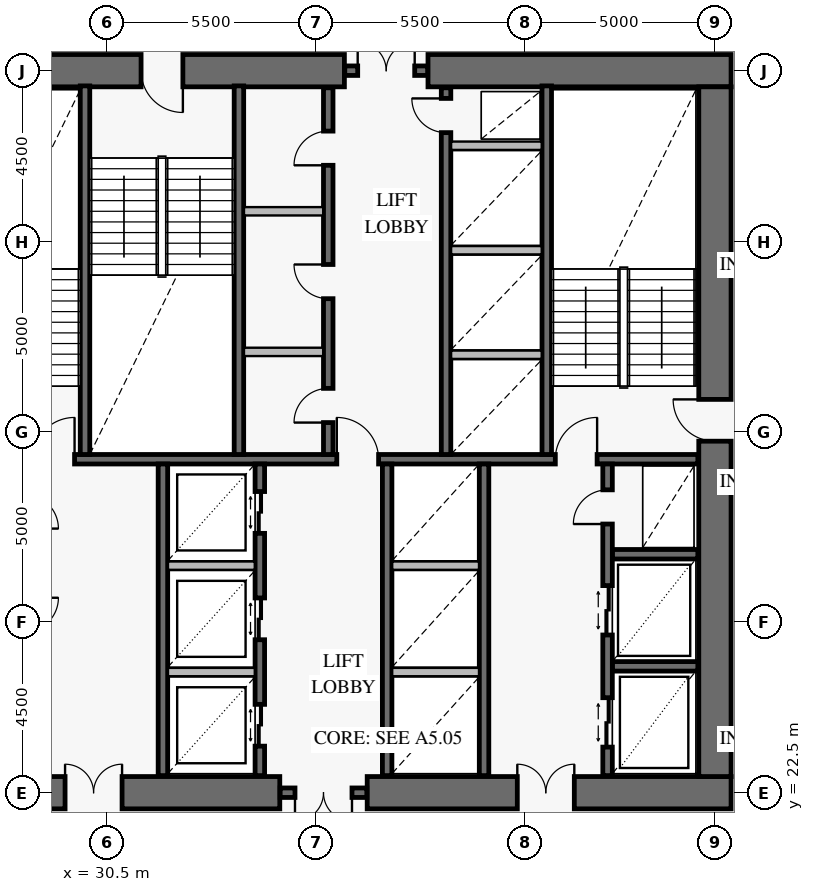
"""IFC4 building model, lengths in metres.
Left out: names, types, materials, properties, quantities, classifications, styles, units other than length and angle.
Written with IfcOpenShell. Run it as: python <this file> out.ifc"""

import sys

from ifc_helpers import new_model, si_unit, direction, frame, frame_2d, origin, place, context, subcontext, project, spatial, rectangle, extrude, element, fill, save


model = new_model("IFC4")
c1 = context("Model", 3, precision=1e-05, world=origin(), true_north=direction((0.0, 1.0)))
c2 = subcontext(c1, "Body", "Model", "MODEL_VIEW")
j1 = project(units=[si_unit("LENGTHUNIT", "METRE"), si_unit("PLANEANGLEUNIT", "RADIAN")], contexts=[c1])
p1 = place(None, origin())
s1 = spatial("IfcSite", under=j1, at=p1, CompositionType="ELEMENT")
p2 = place(p1, origin())
s2 = spatial("IfcBuilding", under=s1, at=p2, CompositionType="ELEMENT")
p3 = place(p2, frame((0.0, 0.0, 62.4)))
s3 = spatial("IfcBuildingStorey", under=s2, at=p3, CompositionType="ELEMENT", Elevation=62.4)
p4 = place(p3, frame((25.075, 22.5, 0.0), z_axis=(0.0, 0.0, 1.0), x_axis=(1.0, 0.0, 0.0)))
e1 = element("IfcWall", 1, at=p4, inside=s3, PredefinedType="SHEAR", context=c2, shape_type="SweptSolid", body=[
    extrude(rectangle(XDim=9.975, YDim=0.85, at=frame_2d((4.988, 0.0))), origin(), (0.0, 0.0, 1.0), 4.2),
])
p5 = place(p4, frame((4.325, 0.0, 0.0)))
e2 = element("IfcOpeningElement", 2, at=p5, cuts=e1, PredefinedType="OPENING", context=c2, shape_type="SweptSolid", body=[
    extrude(rectangle(XDim=1.5, YDim=2.15, at=frame_2d((0.75, 1.075))), frame((0.0, 0.437, 0.0), z_axis=(0.0, -1.0, 0.0), x_axis=(1.0, 0.0, 0.0)), (0.0, 0.0, 1.0), 0.874),
])
p6 = place(p3, frame((37.35, 22.5, 0.0), z_axis=(0.0, 0.0, 1.0), x_axis=(1.0, 0.0, 0.0)))
e3 = element("IfcWall", 3, at=p6, inside=s3, PredefinedType="SHEAR", context=c2, shape_type="SweptSolid", body=[
    extrude(rectangle(XDim=9.575, YDim=0.85, at=frame_2d((4.788, 0.0))), origin(), (0.0, 0.0, 1.0), 4.2),
])
p7 = place(p6, frame((3.95, 0.0, 0.0)))
e4 = element("IfcOpeningElement", 4, at=p7, cuts=e3, PredefinedType="OPENING", context=c2, shape_type="SweptSolid", body=[
    extrude(rectangle(XDim=1.5, YDim=2.15, at=frame_2d((0.75, 1.075))), frame((0.0, 0.437, 0.0), z_axis=(0.0, -1.0, 0.0), x_axis=(1.0, 0.0, 0.0)), (0.0, 0.0, 1.0), 0.874),
])
p8 = place(p3, frame((46.925, 41.5, 0.0), z_axis=(0.0, 0.0, 1.0), x_axis=(-1.0, 0.0, 0.0)))
e5 = element("IfcWall", 5, at=p8, inside=s3, PredefinedType="SHEAR", context=c2, shape_type="SweptSolid", body=[
    extrude(rectangle(XDim=7.975, YDim=0.85, at=frame_2d((3.988, 0.0))), origin(), (0.0, 0.0, 1.0), 4.2),
])
p9 = place(p3, frame((36.75, 41.5, 0.0), z_axis=(0.0, 0.0, 1.0), x_axis=(-1.0, 0.0, 0.0)))
e6 = element("IfcWall", 6, at=p9, inside=s3, PredefinedType="SHEAR", context=c2, shape_type="SweptSolid", body=[
    extrude(rectangle(XDim=11.675, YDim=0.85, at=frame_2d((5.837, 0.0))), origin(), (0.0, 0.0, 1.0), 4.2),
])
p10 = place(p9, frame((4.25, 0.0, 0.0)))
e7 = element("IfcOpeningElement", 7, at=p10, cuts=e6, PredefinedType="OPENING", context=c2, shape_type="SweptSolid", body=[
    extrude(rectangle(XDim=1.1, YDim=2.15, at=frame_2d((0.55, 1.075))), frame((0.0, 0.437, 0.0), z_axis=(0.0, -1.0, 0.0), x_axis=(1.0, 0.0, 0.0)), (0.0, 0.0, 1.0), 0.874),
])
p11 = place(p3, frame((46.5, 22.925, 0.0), z_axis=(0.0, 0.0, 1.0), x_axis=(0.0, 1.0, 0.0)))
e8 = element("IfcWall", 8, at=p11, inside=s3, PredefinedType="SHEAR", context=c2, shape_type="SweptSolid", body=[
    extrude(rectangle(XDim=18.15, YDim=0.85, at=frame_2d((9.075, 0.0))), origin(), (0.0, 0.0, 1.0), 4.2),
])
p12 = place(p11, frame((8.825, 0.0, 0.0)))
e9 = element("IfcOpeningElement", 9, at=p12, cuts=e8, PredefinedType="OPENING", context=c2, shape_type="SweptSolid", body=[
    extrude(rectangle(XDim=1.1, YDim=2.15, at=frame_2d((0.55, 1.075))), frame((0.0, 0.437, 0.0), z_axis=(0.0, -1.0, 0.0), x_axis=(1.0, 0.0, 0.0)), (0.0, 0.0, 1.0), 0.874),
])
p13 = place(p3, frame((35.06, 22.5, 0.0), z_axis=(0.0, 0.0, 1.0), x_axis=(1.0, 0.0, 0.0)))
e10 = element("IfcWall", 10, at=p13, inside=s3, PredefinedType="SOLIDWALL", context=c2, shape_type="SweptSolid", body=[
    extrude(rectangle(XDim=2.28, YDim=0.25, at=frame_2d((1.14, 0.0))), origin(), (0.0, 0.0, 1.0), 4.2),
])
p14 = place(p13, frame((0.39, 0.0, 0.0)))
e11 = element("IfcOpeningElement", 11, at=p14, cuts=e10, PredefinedType="OPENING", context=c2, shape_type="SweptSolid", body=[
    extrude(rectangle(XDim=1.5, YDim=2.15, at=frame_2d((0.75, 1.075))), frame((0.0, 0.137, 0.0), z_axis=(0.0, -1.0, 0.0), x_axis=(1.0, 0.0, 0.0)), (0.0, 0.0, 1.0), 0.274),
])
p15 = place(p3, frame((36.76, 41.5, 0.0), z_axis=(0.0, 0.0, 1.0), x_axis=(1.0, 0.0, 0.0)))
e12 = element("IfcWall", 12, at=p15, inside=s3, PredefinedType="SOLIDWALL", context=c2, shape_type="SweptSolid", body=[
    extrude(rectangle(XDim=2.18, YDim=0.25, at=frame_2d((1.09, 0.0))), origin(), (0.0, 0.0, 1.0), 4.2),
])
p16 = place(p15, frame((0.34, 0.0, 0.0)))
e13 = element("IfcOpeningElement", 13, at=p16, cuts=e12, PredefinedType="OPENING", context=c2, shape_type="SweptSolid", body=[
    extrude(rectangle(XDim=1.5, YDim=2.15, at=frame_2d((0.75, 1.075))), frame((0.0, 0.137, 0.0), z_axis=(0.0, -1.0, 0.0), x_axis=(1.0, 0.0, 0.0)), (0.0, 0.0, 1.0), 0.274),
])
p17 = place(p3, frame((25.95, 31.275, 0.0), z_axis=(0.0, 0.0, 1.0), x_axis=(1.0, 0.0, 0.0)))
e14 = element("IfcWall", 14, at=p17, inside=s3, PredefinedType="SOLIDWALL", context=c2, shape_type="SweptSolid", body=[
    extrude(rectangle(XDim=20.1, YDim=0.25, at=frame_2d((10.05, 0.0))), origin(), (0.0, 0.0, 1.0), 4.2),
])
p18 = place(p17, frame((2.6, 0.0, 0.0)))
e15 = element("IfcOpeningElement", 15, at=p18, cuts=e14, PredefinedType="OPENING", context=c2, shape_type="SweptSolid", body=[
    extrude(rectangle(XDim=1.1, YDim=2.15, at=frame_2d((0.55, 1.075))), frame((0.0, 0.137, 0.0), z_axis=(0.0, -1.0, 0.0), x_axis=(1.0, 0.0, 0.0)), (0.0, 0.0, 1.0), 0.274),
])
p19 = place(p17, frame((10.6, 0.0, 0.0)))
e16 = element("IfcOpeningElement", 16, at=p19, cuts=e14, PredefinedType="OPENING", context=c2, shape_type="SweptSolid", body=[
    extrude(rectangle(XDim=1.1, YDim=2.15, at=frame_2d((0.55, 1.075))), frame((0.0, 0.137, 0.0), z_axis=(0.0, -1.0, 0.0), x_axis=(1.0, 0.0, 0.0)), (0.0, 0.0, 1.0), 0.274),
])
p20 = place(p17, frame((16.35, 0.0, 0.0)))
e17 = element("IfcOpeningElement", 17, at=p20, cuts=e14, PredefinedType="OPENING", context=c2, shape_type="SweptSolid", body=[
    extrude(rectangle(XDim=1.1, YDim=2.15, at=frame_2d((0.55, 1.075))), frame((0.0, 0.137, 0.0), z_axis=(0.0, -1.0, 0.0), x_axis=(1.0, 0.0, 0.0)), (0.0, 0.0, 1.0), 0.274),
])
for number, where, z_axis, x_axis in (
    (18, (29.925, 31.4, 0.0), (0.0, 0.0, 1.0), (0.0, 1.0, 0.0)),
    (19, (33.975, 31.4, 0.0), (0.0, 0.0, 1.0), (0.0, 1.0, 0.0)),
    (20, (42.075, 31.4, 0.0), (0.0, 0.0, 1.0), (0.0, 1.0, 0.0)),
):
    element("IfcWall", number, at=place(p3, frame(where, z_axis=z_axis, x_axis=x_axis)), inside=s3, PredefinedType="SOLIDWALL", context=c2, shape_type="SweptSolid", body=[
        extrude(rectangle(XDim=9.7, YDim=0.25, at=frame_2d((4.85, 0.0))), origin(), (0.0, 0.0, 1.0), 4.2),
    ])
p21 = place(p3, frame((36.325, 31.4, 0.0), z_axis=(0.0, 0.0, 1.0), x_axis=(0.0, 1.0, 0.0)))
e21 = element("IfcWall", 21, at=p21, inside=s3, PredefinedType="SOLIDWALL", context=c2, shape_type="SweptSolid", body=[
    extrude(rectangle(XDim=9.65, YDim=0.25, at=frame_2d((4.825, 0.0))), origin(), (0.0, 0.0, 1.0), 4.2),
])
p22 = place(p21, frame((0.84, 0.0, 0.0)))
e22 = element("IfcOpeningElement", 22, at=p22, cuts=e21, PredefinedType="OPENING", context=c2, shape_type="SweptSolid", body=[
    extrude(rectangle(XDim=0.9, YDim=2.1, at=frame_2d((0.45, 1.05))), frame((0.0, 0.137, 0.0), z_axis=(0.0, -1.0, 0.0), x_axis=(1.0, 0.0, 0.0)), (0.0, 0.0, 1.0), 0.274),
])
p23 = place(p21, frame((4.1, 0.0, 0.0)))
e23 = element("IfcOpeningElement", 23, at=p23, cuts=e21, PredefinedType="OPENING", context=c2, shape_type="SweptSolid", body=[
    extrude(rectangle(XDim=0.9, YDim=2.1, at=frame_2d((0.45, 1.05))), frame((0.0, 0.137, 0.0), z_axis=(0.0, -1.0, 0.0), x_axis=(1.0, 0.0, 0.0)), (0.0, 0.0, 1.0), 0.274),
])
p24 = place(p21, frame((7.61, 0.0, 0.0)))
e24 = element("IfcOpeningElement", 24, at=p24, cuts=e21, PredefinedType="OPENING", context=c2, shape_type="SweptSolid", body=[
    extrude(rectangle(XDim=0.9, YDim=2.1, at=frame_2d((0.45, 1.05))), frame((0.0, 0.137, 0.0), z_axis=(0.0, -1.0, 0.0), x_axis=(1.0, 0.0, 0.0)), (0.0, 0.0, 1.0), 0.274),
])
p25 = place(p3, frame((39.425, 31.4, 0.0), z_axis=(0.0, 0.0, 1.0), x_axis=(0.0, 1.0, 0.0)))
e25 = element("IfcWall", 25, at=p25, inside=s3, PredefinedType="SOLIDWALL", context=c2, shape_type="SweptSolid", body=[
    extrude(rectangle(XDim=9.65, YDim=0.25, at=frame_2d((4.825, 0.0))), origin(), (0.0, 0.0, 1.0), 4.2),
])
p26 = place(p25, frame((8.47, 0.0, 0.0)))
e26 = element("IfcOpeningElement", 26, at=p26, cuts=e25, PredefinedType="OPENING", context=c2, shape_type="SweptSolid", body=[
    extrude(rectangle(XDim=0.9, YDim=2.1, at=frame_2d((0.45, 1.05))), frame((0.0, 0.137, 0.0), z_axis=(0.0, -1.0, 0.0), x_axis=(1.0, 0.0, 0.0)), (0.0, 0.0, 1.0), 0.274),
])
p27 = place(p3, frame((31.975, 22.95, 0.0), z_axis=(0.0, 0.0, 1.0), x_axis=(0.0, 1.0, 0.0)))
e27 = element("IfcWall", 27, at=p27, inside=s3, PredefinedType="SOLIDWALL", context=c2, shape_type="SweptSolid", body=[
    extrude(rectangle(XDim=8.2, YDim=0.25, at=frame_2d((4.1, 0.0))), origin(), (0.0, 0.0, 1.0), 4.2),
])
p28 = place(p3, frame((34.525, 22.95, 0.0), z_axis=(0.0, 0.0, 1.0), x_axis=(0.0, 1.0, 0.0)))
e28 = element("IfcWall", 28, at=p28, inside=s3, PredefinedType="SOLIDWALL", context=c2, shape_type="SweptSolid", body=[
    extrude(rectangle(XDim=8.2, YDim=0.25, at=frame_2d((4.1, 0.0))), origin(), (0.0, 0.0, 1.0), 4.2),
])
p29 = place(p28, frame((0.775, 0.0, 0.0)))
e29 = element("IfcOpeningElement", 29, at=p29, cuts=e28, PredefinedType="OPENING", context=c2, shape_type="SweptSolid", body=[
    extrude(rectangle(XDim=1.1, YDim=2.2, at=frame_2d((0.55, 1.1))), frame((0.0, 0.137, 0.0), z_axis=(0.0, -1.0, 0.0), x_axis=(1.0, 0.0, 0.0)), (0.0, 0.0, 1.0), 0.274),
])
p30 = place(p28, frame((3.575, 0.0, 0.0)))
e30 = element("IfcOpeningElement", 30, at=p30, cuts=e28, PredefinedType="OPENING", context=c2, shape_type="SweptSolid", body=[
    extrude(rectangle(XDim=1.1, YDim=2.2, at=frame_2d((0.55, 1.1))), frame((0.0, 0.137, 0.0), z_axis=(0.0, -1.0, 0.0), x_axis=(1.0, 0.0, 0.0)), (0.0, 0.0, 1.0), 0.274),
])
p31 = place(p28, frame((6.375, 0.0, 0.0)))
e31 = element("IfcOpeningElement", 31, at=p31, cuts=e28, PredefinedType="OPENING", context=c2, shape_type="SweptSolid", body=[
    extrude(rectangle(XDim=1.1, YDim=2.2, at=frame_2d((0.55, 1.1))), frame((0.0, 0.137, 0.0), z_axis=(0.0, -1.0, 0.0), x_axis=(1.0, 0.0, 0.0)), (0.0, 0.0, 1.0), 0.274),
])
for number, where, z_axis, x_axis in (
    (32, (37.875, 22.95, 0.0), (0.0, 0.0, 1.0), (0.0, 1.0, 0.0)),
    (33, (40.425, 22.95, 0.0), (0.0, 0.0, 1.0), (0.0, 1.0, 0.0)),
):
    element("IfcWall", number, at=place(p3, frame(where, z_axis=z_axis, x_axis=x_axis)), inside=s3, PredefinedType="SOLIDWALL", context=c2, shape_type="SweptSolid", body=[
        extrude(rectangle(XDim=8.2, YDim=0.25, at=frame_2d((4.1, 0.0))), origin(), (0.0, 0.0, 1.0), 4.2),
    ])
for number, where, z_axis, x_axis in (
    (34, (43.8, 25.825, 0.0), (0.0, 0.0, 1.0), (1.0, 0.0, 0.0)),
    (35, (43.8, 28.775, 0.0), (0.0, 0.0, 1.0), (1.0, 0.0, 0.0)),
):
    element("IfcWall", number, at=place(p3, frame(where, z_axis=z_axis, x_axis=x_axis)), inside=s3, PredefinedType="SOLIDWALL", context=c2, shape_type="SweptSolid", body=[
        extrude(rectangle(XDim=2.25, YDim=0.25, at=frame_2d((1.125, 0.0))), origin(), (0.0, 0.0, 1.0), 4.2),
    ])
p32 = place(p3, frame((43.675, 22.95, 0.0), z_axis=(0.0, 0.0, 1.0), x_axis=(0.0, 1.0, 0.0)))
e36 = element("IfcWall", 36, at=p32, inside=s3, PredefinedType="SOLIDWALL", context=c2, shape_type="SweptSolid", body=[
    extrude(rectangle(XDim=8.2, YDim=0.25, at=frame_2d((4.1, 0.0))), origin(), (0.0, 0.0, 1.0), 4.2),
])
p33 = place(p32, frame((0.75, 0.0, 0.0)))
e37 = element("IfcOpeningElement", 37, at=p33, cuts=e36, PredefinedType="OPENING", context=c2, shape_type="SweptSolid", body=[
    extrude(rectangle(XDim=1.3, YDim=2.3, at=frame_2d((0.65, 1.15))), frame((0.0, 0.137, 0.0), z_axis=(0.0, -1.0, 0.0), x_axis=(1.0, 0.0, 0.0)), (0.0, 0.0, 1.0), 0.274),
])
p34 = place(p32, frame((3.7, 0.0, 0.0)))
e38 = element("IfcOpeningElement", 38, at=p34, cuts=e36, PredefinedType="OPENING", context=c2, shape_type="SweptSolid", body=[
    extrude(rectangle(XDim=1.3, YDim=2.3, at=frame_2d((0.65, 1.15))), frame((0.0, 0.137, 0.0), z_axis=(0.0, -1.0, 0.0), x_axis=(1.0, 0.0, 0.0)), (0.0, 0.0, 1.0), 0.274),
])
p35 = place(p32, frame((6.62, 0.0, 0.0)))
e39 = element("IfcOpeningElement", 39, at=p35, cuts=e36, PredefinedType="OPENING", context=c2, shape_type="SweptSolid", body=[
    extrude(rectangle(XDim=0.9, YDim=2.1, at=frame_2d((0.45, 1.05))), frame((0.0, 0.137, 0.0), z_axis=(0.0, -1.0, 0.0), x_axis=(1.0, 0.0, 0.0)), (0.0, 0.0, 1.0), 0.274),
])
for number, where, z_axis, x_axis in (
    (40, (34.108, 34.1, 0.0), (0.0, 0.0, 1.0), (1.0, 0.0, 0.0)),
    (41, (34.108, 37.8, 0.0), (0.0, 0.0, 1.0), (1.0, 0.0, 0.0)),
):
    element("IfcWall", number, at=place(p3, frame(where, z_axis=z_axis, x_axis=x_axis)), inside=s3, PredefinedType="PARTITIONING", context=c2, shape_type="SweptSolid", body=[
        extrude(rectangle(XDim=2.084, YDim=0.22, at=frame_2d((1.042, 0.0))), origin(), (0.0, 0.0, 1.0), 3.92),
    ])
for number, where, z_axis, x_axis in (
    (42, (39.558, 34.025, 0.0), (0.0, 0.0, 1.0), (1.0, 0.0, 0.0)),
    (43, (39.558, 36.775, 0.0), (0.0, 0.0, 1.0), (1.0, 0.0, 0.0)),
    (44, (39.558, 39.525, 0.0), (0.0, 0.0, 1.0), (1.0, 0.0, 0.0)),
):
    element("IfcWall", number, at=place(p3, frame(where, z_axis=z_axis, x_axis=x_axis)), inside=s3, PredefinedType="PARTITIONING", context=c2, shape_type="SweptSolid", body=[
        extrude(rectangle(XDim=2.384, YDim=0.22, at=frame_2d((1.192, 0.0))), origin(), (0.0, 0.0, 1.0), 3.92),
    ])
for number, where, z_axis, x_axis in (
    (45, (32.108, 25.675, 0.0), (0.0, 0.0, 1.0), (1.0, 0.0, 0.0)),
    (46, (32.108, 28.475, 0.0), (0.0, 0.0, 1.0), (1.0, 0.0, 0.0)),
):
    element("IfcWall", number, at=place(p3, frame(where, z_axis=z_axis, x_axis=x_axis)), inside=s3, PredefinedType="PARTITIONING", context=c2, shape_type="SweptSolid", body=[
        extrude(rectangle(XDim=2.284, YDim=0.22, at=frame_2d((1.142, 0.0))), origin(), (0.0, 0.0, 1.0), 3.92),
    ])
for number, where, z_axis, x_axis in (
    (47, (38.008, 25.675, 0.0), (0.0, 0.0, 1.0), (1.0, 0.0, 0.0)),
    (48, (38.008, 28.475, 0.0), (0.0, 0.0, 1.0), (1.0, 0.0, 0.0)),
):
    element("IfcWall", number, at=place(p3, frame(where, z_axis=z_axis, x_axis=x_axis)), inside=s3, PredefinedType="PARTITIONING", context=c2, shape_type="SweptSolid", body=[
        extrude(rectangle(XDim=2.284, YDim=0.22, at=frame_2d((1.142, 0.0))), origin(), (0.0, 0.0, 1.0), 3.92),
    ])
p36 = place(p12, origin())
e49 = element("IfcDoor", 49, at=p36, inside=s3, OperationType="SINGLE_SWING_RIGHT", PredefinedType="USERDEFINED", context=c2, shape_type="SweptSolid", body=[
    extrude(rectangle(XDim=1.1, YDim=2.15, at=frame_2d((0.55, 1.075))), frame((0.0, 0.025, 0.0), z_axis=(0.0, -1.0, 0.0), x_axis=(1.0, 0.0, 0.0)), (0.0, 0.0, 1.0), 0.05),
])
fill(e9, e49)
p37 = place(p10, origin())
e50 = element("IfcDoor", 50, at=p37, inside=s3, OperationType="SINGLE_SWING_LEFT", PredefinedType="USERDEFINED", context=c2, shape_type="SweptSolid", body=[
    extrude(rectangle(XDim=1.1, YDim=2.15, at=frame_2d((0.55, 1.075))), frame((0.0, 0.025, 0.0), z_axis=(0.0, -1.0, 0.0), x_axis=(1.0, 0.0, 0.0)), (0.0, 0.0, 1.0), 0.05),
])
fill(e7, e50)
p38 = place(p5, origin())
e51 = element("IfcDoor", 51, at=p38, inside=s3, OperationType="DOUBLE_DOOR_SINGLE_SWING", PredefinedType="DOOR", context=c2, shape_type="SweptSolid", body=[
    extrude(rectangle(XDim=1.5, YDim=2.15, at=frame_2d((0.75, 1.075))), frame((0.0, 0.025, 0.0), z_axis=(0.0, -1.0, 0.0), x_axis=(1.0, 0.0, 0.0)), (0.0, 0.0, 1.0), 0.05),
])
fill(e2, e51)
p39 = place(p7, origin())
e52 = element("IfcDoor", 52, at=p39, inside=s3, OperationType="DOUBLE_DOOR_SINGLE_SWING", PredefinedType="DOOR", context=c2, shape_type="SweptSolid", body=[
    extrude(rectangle(XDim=1.5, YDim=2.15, at=frame_2d((0.75, 1.075))), frame((0.0, 0.025, 0.0), z_axis=(0.0, -1.0, 0.0), x_axis=(1.0, 0.0, 0.0)), (0.0, 0.0, 1.0), 0.05),
])
fill(e4, e52)
p40 = place(p14, frame((1.5, 0.0, 0.0), z_axis=(0.0, 0.0, 1.0), x_axis=(-1.0, 0.0, 0.0)))
e53 = element("IfcDoor", 53, at=p40, inside=s3, OperationType="DOUBLE_DOOR_SINGLE_SWING", PredefinedType="DOOR", context=c2, shape_type="SweptSolid", body=[
    extrude(rectangle(XDim=1.5, YDim=2.15, at=frame_2d((0.75, 1.075))), frame((0.0, 0.025, 0.0), z_axis=(0.0, -1.0, 0.0), x_axis=(1.0, 0.0, 0.0)), (0.0, 0.0, 1.0), 0.05),
])
fill(e11, e53)
p41 = place(p16, origin())
e54 = element("IfcDoor", 54, at=p41, inside=s3, OperationType="DOUBLE_DOOR_SINGLE_SWING", PredefinedType="DOOR", context=c2, shape_type="SweptSolid", body=[
    extrude(rectangle(XDim=1.5, YDim=2.15, at=frame_2d((0.75, 1.075))), frame((0.0, 0.025, 0.0), z_axis=(0.0, -1.0, 0.0), x_axis=(1.0, 0.0, 0.0)), (0.0, 0.0, 1.0), 0.05),
])
fill(e13, e54)
p42 = place(p18, origin())
e55 = element("IfcDoor", 55, at=p42, inside=s3, OperationType="SINGLE_SWING_RIGHT", PredefinedType="USERDEFINED", context=c2, shape_type="SweptSolid", body=[
    extrude(rectangle(XDim=1.1, YDim=2.15, at=frame_2d((0.55, 1.075))), frame((0.0, 0.025, 0.0), z_axis=(0.0, -1.0, 0.0), x_axis=(1.0, 0.0, 0.0)), (0.0, 0.0, 1.0), 0.05),
])
fill(e15, e55)
p43 = place(p19, origin())
e56 = element("IfcDoor", 56, at=p43, inside=s3, OperationType="SINGLE_SWING_LEFT", PredefinedType="USERDEFINED", context=c2, shape_type="SweptSolid", body=[
    extrude(rectangle(XDim=1.1, YDim=2.15, at=frame_2d((0.55, 1.075))), frame((0.0, 0.025, 0.0), z_axis=(0.0, -1.0, 0.0), x_axis=(1.0, 0.0, 0.0)), (0.0, 0.0, 1.0), 0.05),
])
fill(e16, e56)
p44 = place(p20, origin())
e57 = element("IfcDoor", 57, at=p44, inside=s3, OperationType="SINGLE_SWING_RIGHT", PredefinedType="USERDEFINED", context=c2, shape_type="SweptSolid", body=[
    extrude(rectangle(XDim=1.1, YDim=2.15, at=frame_2d((0.55, 1.075))), frame((0.0, 0.025, 0.0), z_axis=(0.0, -1.0, 0.0), x_axis=(1.0, 0.0, 0.0)), (0.0, 0.0, 1.0), 0.05),
])
fill(e17, e57)
p45 = place(p22, origin())
e58 = element("IfcDoor", 58, at=p45, inside=s3, OperationType="SINGLE_SWING_LEFT", PredefinedType="DOOR", context=c2, shape_type="SweptSolid", body=[
    extrude(rectangle(XDim=0.9, YDim=2.1, at=frame_2d((0.45, 1.05))), frame((0.0, 0.025, 0.0), z_axis=(0.0, -1.0, 0.0), x_axis=(1.0, 0.0, 0.0)), (0.0, 0.0, 1.0), 0.05),
])
fill(e22, e58)
p46 = place(p23, origin())
e59 = element("IfcDoor", 59, at=p46, inside=s3, OperationType="SINGLE_SWING_RIGHT", PredefinedType="DOOR", context=c2, shape_type="SweptSolid", body=[
    extrude(rectangle(XDim=0.9, YDim=2.1, at=frame_2d((0.45, 1.05))), frame((0.0, 0.025, 0.0), z_axis=(0.0, -1.0, 0.0), x_axis=(1.0, 0.0, 0.0)), (0.0, 0.0, 1.0), 0.05),
])
fill(e23, e59)
p47 = place(p24, origin())
e60 = element("IfcDoor", 60, at=p47, inside=s3, OperationType="SINGLE_SWING_LEFT", PredefinedType="DOOR", context=c2, shape_type="SweptSolid", body=[
    extrude(rectangle(XDim=0.9, YDim=2.1, at=frame_2d((0.45, 1.05))), frame((0.0, 0.025, 0.0), z_axis=(0.0, -1.0, 0.0), x_axis=(1.0, 0.0, 0.0)), (0.0, 0.0, 1.0), 0.05),
])
fill(e24, e60)
p48 = place(p26, origin())
e61 = element("IfcDoor", 61, at=p48, inside=s3, OperationType="SINGLE_SWING_RIGHT", PredefinedType="DOOR", context=c2, shape_type="SweptSolid", body=[
    extrude(rectangle(XDim=0.9, YDim=2.1, at=frame_2d((0.45, 1.05))), frame((0.0, 0.025, 0.0), z_axis=(0.0, -1.0, 0.0), x_axis=(1.0, 0.0, 0.0)), (0.0, 0.0, 1.0), 0.05),
])
fill(e26, e61)
p49 = place(p29, frame((1.1, 0.0, 0.0), z_axis=(0.0, 0.0, 1.0), x_axis=(-1.0, 0.0, 0.0)))
e62 = element("IfcDoor", 62, at=p49, inside=s3, OperationType="DOUBLE_DOOR_SLIDING", PredefinedType="DOOR", context=c2, shape_type="SweptSolid", body=[
    extrude(rectangle(XDim=1.1, YDim=2.2, at=frame_2d((0.55, 1.1))), frame((0.0, 0.025, 0.0), z_axis=(0.0, -1.0, 0.0), x_axis=(1.0, 0.0, 0.0)), (0.0, 0.0, 1.0), 0.05),
])
fill(e29, e62)
p50 = place(p30, frame((1.1, 0.0, 0.0), z_axis=(0.0, 0.0, 1.0), x_axis=(-1.0, 0.0, 0.0)))
e63 = element("IfcDoor", 63, at=p50, inside=s3, OperationType="DOUBLE_DOOR_SLIDING", PredefinedType="DOOR", context=c2, shape_type="SweptSolid", body=[
    extrude(rectangle(XDim=1.1, YDim=2.2, at=frame_2d((0.55, 1.1))), frame((0.0, 0.025, 0.0), z_axis=(0.0, -1.0, 0.0), x_axis=(1.0, 0.0, 0.0)), (0.0, 0.0, 1.0), 0.05),
])
fill(e30, e63)
p51 = place(p31, frame((1.1, 0.0, 0.0), z_axis=(0.0, 0.0, 1.0), x_axis=(-1.0, 0.0, 0.0)))
e64 = element("IfcDoor", 64, at=p51, inside=s3, OperationType="DOUBLE_DOOR_SLIDING", PredefinedType="DOOR", context=c2, shape_type="SweptSolid", body=[
    extrude(rectangle(XDim=1.1, YDim=2.2, at=frame_2d((0.55, 1.1))), frame((0.0, 0.025, 0.0), z_axis=(0.0, -1.0, 0.0), x_axis=(1.0, 0.0, 0.0)), (0.0, 0.0, 1.0), 0.05),
])
fill(e31, e64)
p52 = place(p33, origin())
e65 = element("IfcDoor", 65, at=p52, inside=s3, OperationType="DOUBLE_DOOR_SLIDING", PredefinedType="DOOR", context=c2, shape_type="SweptSolid", body=[
    extrude(rectangle(XDim=1.3, YDim=2.3, at=frame_2d((0.65, 1.15))), frame((0.0, 0.025, 0.0), z_axis=(0.0, -1.0, 0.0), x_axis=(1.0, 0.0, 0.0)), (0.0, 0.0, 1.0), 0.05),
])
fill(e37, e65)
p53 = place(p34, origin())
e66 = element("IfcDoor", 66, at=p53, inside=s3, OperationType="DOUBLE_DOOR_SLIDING", PredefinedType="DOOR", context=c2, shape_type="SweptSolid", body=[
    extrude(rectangle(XDim=1.3, YDim=2.3, at=frame_2d((0.65, 1.15))), frame((0.0, 0.025, 0.0), z_axis=(0.0, -1.0, 0.0), x_axis=(1.0, 0.0, 0.0)), (0.0, 0.0, 1.0), 0.05),
])
fill(e38, e66)
p54 = place(p35, origin())
e67 = element("IfcDoor", 67, at=p54, inside=s3, OperationType="SINGLE_SWING_LEFT", PredefinedType="DOOR", context=c2, shape_type="SweptSolid", body=[
    extrude(rectangle(XDim=0.9, YDim=2.1, at=frame_2d((0.45, 1.05))), frame((0.0, 0.025, 0.0), z_axis=(0.0, -1.0, 0.0), x_axis=(1.0, 0.0, 0.0)), (0.0, 0.0, 1.0), 0.05),
])
fill(e39, e67)
save(model, sys.argv[1])
